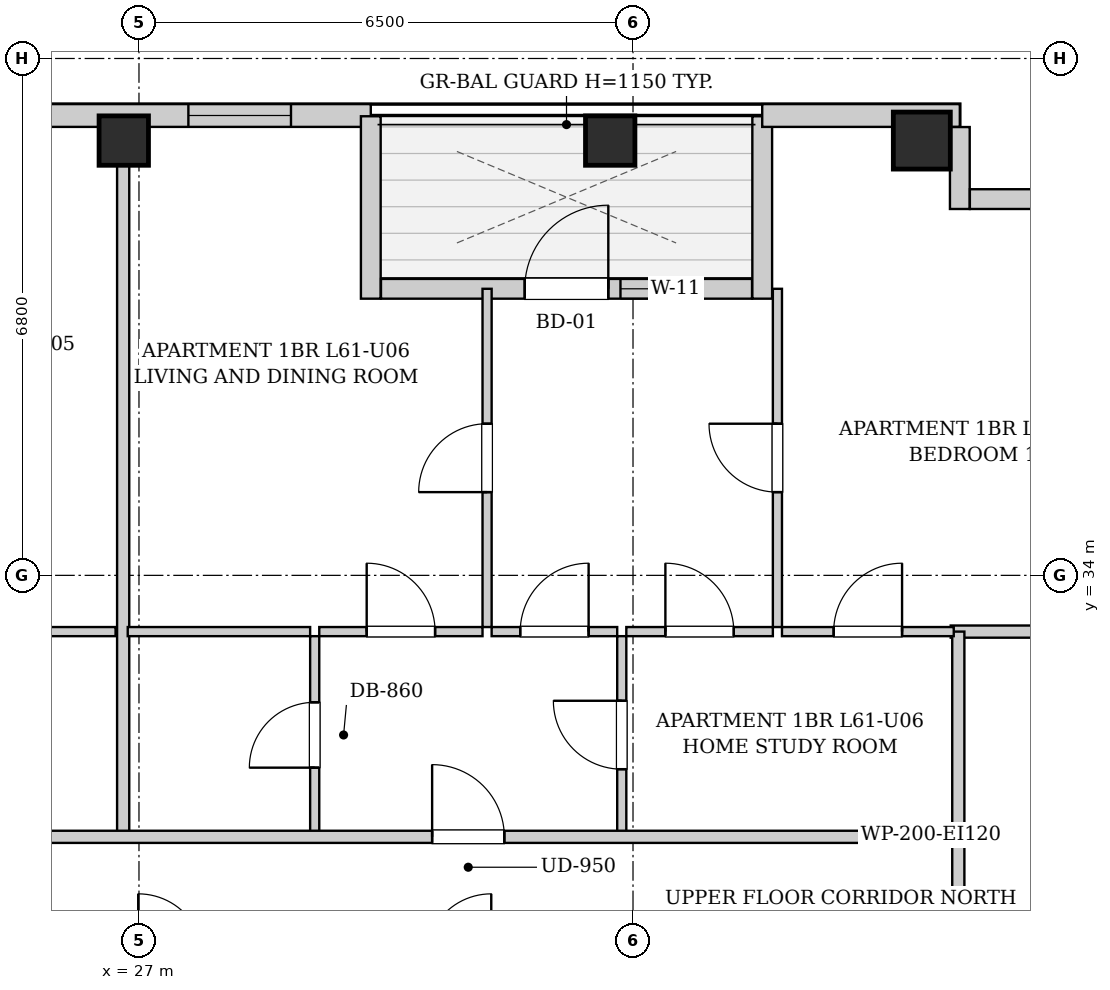
"""IFC4 building model, lengths in metres.
Left out: names, types, materials, properties, quantities, classifications, styles, units other than length and angle.
Written with IfcOpenShell. Run it as: python <this file> out.ifc"""

import sys

from ifc_helpers import new_model, si_unit, direction, frame, frame_2d, origin, origin_2d, place, context, subcontext, project, spatial, rectangle, extrude, element, fill, save


model = new_model("IFC4")
c1 = context("Model", 3, precision=1e-05, world=origin(), true_north=direction((0.0, 1.0)))
c2 = subcontext(c1, "Body", "Model", "MODEL_VIEW")
j1 = project(units=[si_unit("LENGTHUNIT", "METRE"), si_unit("PLANEANGLEUNIT", "RADIAN")], contexts=[c1])
p1 = place(None, origin())
s1 = spatial("IfcSite", under=j1, at=p1, CompositionType="ELEMENT")
p2 = place(p1, origin())
s2 = spatial("IfcBuilding", under=s1, at=p2, CompositionType="ELEMENT")
p3 = place(p2, frame((0.0, 0.0, 210.7)))
s3 = spatial("IfcBuildingStorey", under=s2, at=p3, CompositionType="ELEMENT", Elevation=210.7)
for number, where, z_axis, x_axis in (
    (1, (26.8, 39.72, 0.0), (0.0, 0.0, 1.0), (1.0, 0.0, 0.0)),
    (2, (33.2, 39.72, 0.0), (0.0, 0.0, 1.0), (1.0, 0.0, 0.0)),
):
    element("IfcColumn", number, at=place(p3, frame(where, z_axis=z_axis, x_axis=x_axis)), inside=s3, PredefinedType="COLUMN", context=c2, shape_type="SweptSolid", body=[
        extrude(rectangle(XDim=0.65, YDim=0.65, at=origin_2d()), origin(), (0.0, 0.0, 1.0), 3.3),
    ])
p4 = place(p3, frame((37.3, 39.72, 0.0), z_axis=(0.0, 0.0, 1.0), x_axis=(1.0, 0.0, 0.0)))
e3 = element("IfcColumn", 3, at=p4, inside=s3, PredefinedType="COLUMN", context=c2, shape_type="SweptSolid", body=[
    extrude(rectangle(XDim=0.75, YDim=0.75, at=origin_2d()), origin(), (0.0, 0.0, 1.0), 3.3),
])
p5 = place(p3, frame((13.1, 40.05, 0.0), z_axis=(0.0, 0.0, 1.0), x_axis=(1.0, 0.0, 0.0)))
e4 = element("IfcWall", 4, at=p5, inside=s3, PredefinedType="SOLIDWALL", context=c2, shape_type="SweptSolid", body=[
    extrude(rectangle(XDim=16.95, YDim=0.3, at=frame_2d((8.475, 0.0))), origin(), (0.0, 0.0, 1.0), 3.04),
])
p6 = place(p5, frame((2.865, 0.0, 0.55)))
e5 = element("IfcOpeningElement", 5, at=p6, cuts=e4, PredefinedType="OPENING", context=c2, shape_type="SweptSolid", body=[
    extrude(rectangle(XDim=1.35, YDim=1.2, at=frame_2d((0.675, 0.6))), frame((0.0, 0.16, 0.0), z_axis=(0.0, -1.0, 0.0), x_axis=(1.0, 0.0, 0.0)), (0.0, 0.0, 1.0), 0.32),
])
p7 = place(p5, frame((5.85, 0.0, 0.55)))
e6 = element("IfcOpeningElement", 6, at=p7, cuts=e4, PredefinedType="OPENING", context=c2, shape_type="SweptSolid", body=[
    extrude(rectangle(XDim=1.35, YDim=1.2, at=frame_2d((0.675, 0.6))), frame((0.0, 0.16, 0.0), z_axis=(0.0, -1.0, 0.0), x_axis=(1.0, 0.0, 0.0)), (0.0, 0.0, 1.0), 0.32),
])
p8 = place(p5, frame((8.72, 0.0, 0.55)))
e7 = element("IfcOpeningElement", 7, at=p8, cuts=e4, PredefinedType="OPENING", context=c2, shape_type="SweptSolid", body=[
    extrude(rectangle(XDim=0.68, YDim=1.2, at=frame_2d((0.34, 0.6))), frame((0.0, 0.16, 0.0), z_axis=(0.0, -1.0, 0.0), x_axis=(1.0, 0.0, 0.0)), (0.0, 0.0, 1.0), 0.32),
])
p9 = place(p5, frame((14.55, 0.0, 0.55)))
e8 = element("IfcOpeningElement", 8, at=p9, cuts=e4, PredefinedType="OPENING", context=c2, shape_type="SweptSolid", body=[
    extrude(rectangle(XDim=1.35, YDim=1.2, at=frame_2d((0.675, 0.6))), frame((0.0, 0.16, 0.0), z_axis=(0.0, -1.0, 0.0), x_axis=(1.0, 0.0, 0.0)), (0.0, 0.0, 1.0), 0.32),
])
p10 = place(p3, frame((30.05, 40.04, 0.0), z_axis=(0.0, 0.0, 1.0), x_axis=(0.0, -1.0, 0.0)))
e9 = element("IfcWall", 9, at=p10, inside=s3, PredefinedType="SOLIDWALL", context=c2, shape_type="SweptSolid", body=[
    extrude(rectangle(XDim=2.4, YDim=0.26, at=frame_2d((1.2, 0.0))), origin(), (0.0, 0.0, 1.0), 3.04),
])
p11 = place(p3, frame((30.184, 37.77, 0.0), z_axis=(0.0, 0.0, 1.0), x_axis=(1.0, 0.0, 0.0)))
e10 = element("IfcWall", 10, at=p11, inside=s3, PredefinedType="SOLIDWALL", context=c2, shape_type="SweptSolid", body=[
    extrude(rectangle(XDim=4.882, YDim=0.26, at=frame_2d((2.441, 0.0))), origin(), (0.0, 0.0, 1.0), 3.04),
])
p12 = place(p11, frame((1.891, 0.0, 0.0)))
e11 = element("IfcOpeningElement", 11, at=p12, cuts=e10, PredefinedType="OPENING", context=c2, shape_type="SweptSolid", body=[
    extrude(rectangle(XDim=1.1, YDim=2.0, at=frame_2d((0.55, 1.0))), frame((0.0, 0.14, 0.0), z_axis=(0.0, -1.0, 0.0), x_axis=(1.0, 0.0, 0.0)), (0.0, 0.0, 1.0), 0.28),
])
p13 = place(p11, frame((3.151, 0.0, 0.55)))
e12 = element("IfcOpeningElement", 12, at=p13, cuts=e10, PredefinedType="OPENING", context=c2, shape_type="SweptSolid", body=[
    extrude(rectangle(XDim=0.85, YDim=1.2, at=frame_2d((0.425, 0.6))), frame((0.0, 0.14, 0.0), z_axis=(0.0, -1.0, 0.0), x_axis=(1.0, 0.0, 0.0)), (0.0, 0.0, 1.0), 0.28),
])
p14 = place(p3, frame((35.2, 37.64, 0.0), z_axis=(0.0, 0.0, 1.0), x_axis=(0.0, 1.0, 0.0)))
e13 = element("IfcWall", 13, at=p14, inside=s3, PredefinedType="SOLIDWALL", context=c2, shape_type="SweptSolid", body=[
    extrude(rectangle(XDim=2.4, YDim=0.26, at=frame_2d((1.2, 0.0))), origin(), (0.0, 0.0, 1.0), 3.04),
])
p15 = place(p3, frame((35.2, 40.05, 0.0), z_axis=(0.0, 0.0, 1.0), x_axis=(1.0, 0.0, 0.0)))
e14 = element("IfcWall", 14, at=p15, inside=s3, PredefinedType="SOLIDWALL", context=c2, shape_type="SweptSolid", body=[
    extrude(rectangle(XDim=2.6, YDim=0.3, at=frame_2d((1.3, 0.0))), origin(), (0.0, 0.0, 1.0), 3.04),
])
p16 = place(p3, frame((37.8, 39.898, 0.0), z_axis=(0.0, 0.0, 1.0), x_axis=(0.0, -1.0, 0.0)))
e15 = element("IfcWall", 15, at=p16, inside=s3, PredefinedType="SOLIDWALL", context=c2, shape_type="SweptSolid", body=[
    extrude(rectangle(XDim=1.078, YDim=0.26, at=frame_2d((0.539, 0.0))), origin(), (0.0, 0.0, 1.0), 3.04),
])
p17 = place(p3, frame((37.932, 38.95, 0.0), z_axis=(0.0, 0.0, 1.0), x_axis=(1.0, 0.0, 0.0)))
e16 = element("IfcWall", 16, at=p17, inside=s3, PredefinedType="SOLIDWALL", context=c2, shape_type="SweptSolid", body=[
    extrude(rectangle(XDim=1.248, YDim=0.26, at=frame_2d((0.624, 0.0))), origin(), (0.0, 0.0, 1.0), 3.04),
])
p18 = place(p3, frame((37.78, 28.98, 0.0), z_axis=(0.0, 0.0, 1.0), x_axis=(0.0, 1.0, 0.0)))
e17 = element("IfcWall", 17, at=p18, inside=s3, PredefinedType="PARTITIONING", context=c2, shape_type="SweptSolid", body=[
    extrude(rectangle(XDim=1.58, YDim=0.16, at=frame_2d((0.79, 0.0))), origin(), (0.0, 0.0, 1.0), 3.04),
])
p19 = place(p3, frame((23.535, 33.26, 0.0), z_axis=(0.0, 0.0, 1.0), x_axis=(1.0, 0.0, 0.0)))
e18 = element("IfcWall", 18, at=p19, inside=s3, PredefinedType="PARTITIONING", context=c2, shape_type="SweptSolid", body=[
    extrude(rectangle(XDim=3.157, YDim=0.12, at=frame_2d((1.579, 0.0))), origin(), (0.0, 0.0, 1.0), 3.04),
])
p20 = place(p19, frame((1.129, 0.0, 0.0)))
e19 = element("IfcOpeningElement", 19, at=p20, cuts=e18, PredefinedType="OPENING", context=c2, shape_type="SweptSolid", body=[
    extrude(rectangle(XDim=0.9, YDim=2.05, at=frame_2d((0.45, 1.025))), frame((0.0, 0.07, 0.0), z_axis=(0.0, -1.0, 0.0), x_axis=(1.0, 0.0, 0.0)), (0.0, 0.0, 1.0), 0.14),
])
p21 = place(p3, frame((37.68, 33.26, 0.0), z_axis=(0.0, 0.0, 1.0), x_axis=(1.0, 0.0, 0.0)))
e20 = element("IfcWall", 20, at=p21, inside=s3, PredefinedType="PARTITIONING", context=c2, shape_type="SweptSolid", body=[
    extrude(rectangle(XDim=2.34, YDim=0.16, at=frame_2d((1.17, 0.0))), origin(), (0.0, 0.0, 1.0), 3.04),
])
p22 = place(p3, frame((37.78, 30.6, 0.0), z_axis=(0.0, 0.0, 1.0), x_axis=(0.0, 1.0, 0.0)))
e21 = element("IfcWall", 21, at=p22, inside=s3, PredefinedType="PARTITIONING", context=c2, shape_type="SweptSolid", body=[
    extrude(rectangle(XDim=2.66, YDim=0.16, at=frame_2d((1.33, 0.0))), origin(), (0.0, 0.0, 1.0), 3.04),
])
p23 = place(p3, frame((26.792, 30.6, 0.0), z_axis=(0.0, 0.0, 1.0), x_axis=(0.0, 1.0, 0.0)))
e22 = element("IfcWall", 22, at=p23, inside=s3, PredefinedType="PARTITIONING", context=c2, shape_type="SweptSolid", body=[
    extrude(rectangle(XDim=9.32, YDim=0.16, at=frame_2d((4.66, 0.0))), origin(), (0.0, 0.0, 1.0), 3.04),
])
p24 = place(p3, frame((29.312, 30.6, 0.0), z_axis=(0.0, 0.0, 1.0), x_axis=(0.0, 1.0, 0.0)))
e23 = element("IfcWall", 23, at=p24, inside=s3, PredefinedType="PARTITIONING", context=c2, shape_type="SweptSolid", body=[
    extrude(rectangle(XDim=2.6, YDim=0.12, at=frame_2d((1.3, 0.0))), origin(), (0.0, 0.0, 1.0), 3.04),
])
p25 = place(p24, frame((0.87, 0.0, 0.0)))
e24 = element("IfcOpeningElement", 24, at=p25, cuts=e23, PredefinedType="OPENING", context=c2, shape_type="SweptSolid", body=[
    extrude(rectangle(XDim=0.86, YDim=2.05, at=frame_2d((0.43, 1.025))), frame((0.0, 0.07, 0.0), z_axis=(0.0, -1.0, 0.0), x_axis=(1.0, 0.0, 0.0)), (0.0, 0.0, 1.0), 0.14),
])
p26 = place(p3, frame((26.852, 33.26, 0.0), z_axis=(0.0, 0.0, 1.0), x_axis=(1.0, 0.0, 0.0)))
e25 = element("IfcWall", 25, at=p26, inside=s3, PredefinedType="PARTITIONING", context=c2, shape_type="SweptSolid", body=[
    extrude(rectangle(XDim=2.4, YDim=0.12, at=frame_2d((1.2, 0.0))), origin(), (0.0, 0.0, 1.0), 3.04),
])
p27 = place(p3, frame((33.352, 30.6, 0.0), z_axis=(0.0, 0.0, 1.0), x_axis=(0.0, 1.0, 0.0)))
e26 = element("IfcWall", 26, at=p27, inside=s3, PredefinedType="PARTITIONING", context=c2, shape_type="SweptSolid", body=[
    extrude(rectangle(XDim=2.6, YDim=0.12, at=frame_2d((1.3, 0.0))), origin(), (0.0, 0.0, 1.0), 3.04),
])
p28 = place(p27, frame((0.85, 0.0, 0.0)))
e27 = element("IfcOpeningElement", 27, at=p28, cuts=e26, PredefinedType="OPENING", context=c2, shape_type="SweptSolid", body=[
    extrude(rectangle(XDim=0.9, YDim=2.05, at=frame_2d((0.45, 1.025))), frame((0.0, 0.07, 0.0), z_axis=(0.0, -1.0, 0.0), x_axis=(1.0, 0.0, 0.0)), (0.0, 0.0, 1.0), 0.14),
])
p29 = place(p3, frame((29.372, 33.26, 0.0), z_axis=(0.0, 0.0, 1.0), x_axis=(1.0, 0.0, 0.0)))
e28 = element("IfcWall", 28, at=p29, inside=s3, PredefinedType="PARTITIONING", context=c2, shape_type="SweptSolid", body=[
    extrude(rectangle(XDim=2.148, YDim=0.12, at=frame_2d((1.074, 0.0))), origin(), (0.0, 0.0, 1.0), 3.04),
])
p30 = place(p29, frame((0.624, 0.0, 0.0)))
e29 = element("IfcOpeningElement", 29, at=p30, cuts=e28, PredefinedType="OPENING", context=c2, shape_type="SweptSolid", body=[
    extrude(rectangle(XDim=0.9, YDim=2.05, at=frame_2d((0.45, 1.025))), frame((0.0, 0.07, 0.0), z_axis=(0.0, -1.0, 0.0), x_axis=(1.0, 0.0, 0.0)), (0.0, 0.0, 1.0), 0.14),
])
p31 = place(p3, frame((31.64, 33.26, 0.0), z_axis=(0.0, 0.0, 1.0), x_axis=(1.0, 0.0, 0.0)))
e30 = element("IfcWall", 30, at=p31, inside=s3, PredefinedType="PARTITIONING", context=c2, shape_type="SweptSolid", body=[
    extrude(rectangle(XDim=1.652, YDim=0.12, at=frame_2d((0.826, 0.0))), origin(), (0.0, 0.0, 1.0), 3.04),
])
p32 = place(p31, frame((0.376, 0.0, 0.0)))
e31 = element("IfcOpeningElement", 31, at=p32, cuts=e30, PredefinedType="OPENING", context=c2, shape_type="SweptSolid", body=[
    extrude(rectangle(XDim=0.9, YDim=2.05, at=frame_2d((0.45, 1.025))), frame((0.0, 0.07, 0.0), z_axis=(0.0, -1.0, 0.0), x_axis=(1.0, 0.0, 0.0)), (0.0, 0.0, 1.0), 0.14),
])
p33 = place(p3, frame((33.412, 33.26, 0.0), z_axis=(0.0, 0.0, 1.0), x_axis=(1.0, 0.0, 0.0)))
e32 = element("IfcWall", 32, at=p33, inside=s3, PredefinedType="PARTITIONING", context=c2, shape_type="SweptSolid", body=[
    extrude(rectangle(XDim=1.928, YDim=0.12, at=frame_2d((0.964, 0.0))), origin(), (0.0, 0.0, 1.0), 3.04),
])
p34 = place(p33, frame((0.514, 0.0, 0.0)))
e33 = element("IfcOpeningElement", 33, at=p34, cuts=e32, PredefinedType="OPENING", context=c2, shape_type="SweptSolid", body=[
    extrude(rectangle(XDim=0.9, YDim=2.05, at=frame_2d((0.45, 1.025))), frame((0.0, 0.07, 0.0), z_axis=(0.0, -1.0, 0.0), x_axis=(1.0, 0.0, 0.0)), (0.0, 0.0, 1.0), 0.14),
])
p35 = place(p3, frame((35.46, 33.26, 0.0), z_axis=(0.0, 0.0, 1.0), x_axis=(1.0, 0.0, 0.0)))
e34 = element("IfcWall", 34, at=p35, inside=s3, PredefinedType="PARTITIONING", context=c2, shape_type="SweptSolid", body=[
    extrude(rectangle(XDim=2.26, YDim=0.12, at=frame_2d((1.13, 0.0))), origin(), (0.0, 0.0, 1.0), 3.04),
])
p36 = place(p35, frame((0.68, 0.0, 0.0)))
e35 = element("IfcOpeningElement", 35, at=p36, cuts=e34, PredefinedType="OPENING", context=c2, shape_type="SweptSolid", body=[
    extrude(rectangle(XDim=0.9, YDim=2.05, at=frame_2d((0.45, 1.025))), frame((0.0, 0.07, 0.0), z_axis=(0.0, -1.0, 0.0), x_axis=(1.0, 0.0, 0.0)), (0.0, 0.0, 1.0), 0.14),
])
p37 = place(p3, frame((31.58, 33.32, 0.0), z_axis=(0.0, 0.0, 1.0), x_axis=(0.0, 1.0, 0.0)))
e36 = element("IfcWall", 36, at=p37, inside=s3, PredefinedType="PARTITIONING", context=c2, shape_type="SweptSolid", body=[
    extrude(rectangle(XDim=4.45, YDim=0.12, at=frame_2d((2.225, 0.0))), origin(), (0.0, 0.0, 1.0), 3.04),
])
p38 = place(p37, frame((1.775, 0.0, 0.0)))
e37 = element("IfcOpeningElement", 37, at=p38, cuts=e36, PredefinedType="OPENING", context=c2, shape_type="SweptSolid", body=[
    extrude(rectangle(XDim=0.9, YDim=2.05, at=frame_2d((0.45, 1.025))), frame((0.0, 0.07, 0.0), z_axis=(0.0, -1.0, 0.0), x_axis=(1.0, 0.0, 0.0)), (0.0, 0.0, 1.0), 0.14),
])
p39 = place(p3, frame((35.4, 33.32, 0.0), z_axis=(0.0, 0.0, 1.0), x_axis=(0.0, 1.0, 0.0)))
e38 = element("IfcWall", 38, at=p39, inside=s3, PredefinedType="PARTITIONING", context=c2, shape_type="SweptSolid", body=[
    extrude(rectangle(XDim=4.45, YDim=0.12, at=frame_2d((2.225, 0.0))), origin(), (0.0, 0.0, 1.0), 3.04),
])
p40 = place(p39, frame((1.775, 0.0, 0.0)))
e39 = element("IfcOpeningElement", 39, at=p40, cuts=e38, PredefinedType="OPENING", context=c2, shape_type="SweptSolid", body=[
    extrude(rectangle(XDim=0.9, YDim=2.05, at=frame_2d((0.45, 1.025))), frame((0.0, 0.07, 0.0), z_axis=(0.0, -1.0, 0.0), x_axis=(1.0, 0.0, 0.0)), (0.0, 0.0, 1.0), 0.14),
])
p41 = place(p3, frame((13.15, 30.56, 0.0), z_axis=(0.0, 0.0, 1.0), x_axis=(1.0, 0.0, 0.0)))
e40 = element("IfcWall", 40, at=p41, inside=s3, PredefinedType="PARTITIONING", context=c2, shape_type="SweptSolid", body=[
    extrude(rectangle(XDim=24.6, YDim=0.16, at=frame_2d((12.3, 0.0))), origin(), (0.0, 0.0, 1.0), 3.04),
])
p42 = place(p41, frame((3.115, 0.0, 0.0)))
e41 = element("IfcOpeningElement", 41, at=p42, cuts=e40, PredefinedType="OPENING", context=c2, shape_type="SweptSolid", body=[
    extrude(rectangle(XDim=0.95, YDim=2.1, at=frame_2d((0.475, 1.05))), frame((0.0, 0.09, 0.0), z_axis=(0.0, -1.0, 0.0), x_axis=(1.0, 0.0, 0.0)), (0.0, 0.0, 1.0), 0.18),
])
p43 = place(p41, frame((11.489, 0.0, 0.0)))
e42 = element("IfcOpeningElement", 42, at=p43, cuts=e40, PredefinedType="OPENING", context=c2, shape_type="SweptSolid", body=[
    extrude(rectangle(XDim=0.95, YDim=2.1, at=frame_2d((0.475, 1.05))), frame((0.0, 0.09, 0.0), z_axis=(0.0, -1.0, 0.0), x_axis=(1.0, 0.0, 0.0)), (0.0, 0.0, 1.0), 0.18),
])
p44 = place(p41, frame((17.707, 0.0, 0.0)))
e43 = element("IfcOpeningElement", 43, at=p44, cuts=e40, PredefinedType="OPENING", context=c2, shape_type="SweptSolid", body=[
    extrude(rectangle(XDim=0.95, YDim=2.1, at=frame_2d((0.475, 1.05))), frame((0.0, 0.09, 0.0), z_axis=(0.0, -1.0, 0.0), x_axis=(1.0, 0.0, 0.0)), (0.0, 0.0, 1.0), 0.18),
])
p45 = place(p25, origin())
e44 = element("IfcDoor", 44, at=p45, inside=s3, OperationType="SINGLE_SWING_LEFT", PredefinedType="DOOR", context=c2, shape_type="SweptSolid", body=[
    extrude(rectangle(XDim=0.86, YDim=2.05, at=frame_2d((0.43, 1.025))), frame((0.0, 0.025, 0.0), z_axis=(0.0, -1.0, 0.0), x_axis=(1.0, 0.0, 0.0)), (0.0, 0.0, 1.0), 0.05),
])
fill(e24, e44)
p46 = place(p28, origin())
e45 = element("IfcDoor", 45, at=p46, inside=s3, OperationType="SINGLE_SWING_RIGHT", PredefinedType="DOOR", context=c2, shape_type="SweptSolid", body=[
    extrude(rectangle(XDim=0.9, YDim=2.05, at=frame_2d((0.45, 1.025))), frame((0.0, 0.025, 0.0), z_axis=(0.0, -1.0, 0.0), x_axis=(1.0, 0.0, 0.0)), (0.0, 0.0, 1.0), 0.05),
])
fill(e27, e45)
p47 = place(p30, origin())
e46 = element("IfcDoor", 46, at=p47, inside=s3, OperationType="SINGLE_SWING_LEFT", PredefinedType="DOOR", context=c2, shape_type="SweptSolid", body=[
    extrude(rectangle(XDim=0.9, YDim=2.05, at=frame_2d((0.45, 1.025))), frame((0.0, 0.025, 0.0), z_axis=(0.0, -1.0, 0.0), x_axis=(1.0, 0.0, 0.0)), (0.0, 0.0, 1.0), 0.05),
])
fill(e29, e46)
p48 = place(p32, origin())
e47 = element("IfcDoor", 47, at=p48, inside=s3, OperationType="SINGLE_SWING_RIGHT", PredefinedType="DOOR", context=c2, shape_type="SweptSolid", body=[
    extrude(rectangle(XDim=0.9, YDim=2.05, at=frame_2d((0.45, 1.025))), frame((0.0, 0.025, 0.0), z_axis=(0.0, -1.0, 0.0), x_axis=(1.0, 0.0, 0.0)), (0.0, 0.0, 1.0), 0.05),
])
fill(e31, e47)
p49 = place(p34, origin())
e48 = element("IfcDoor", 48, at=p49, inside=s3, OperationType="SINGLE_SWING_LEFT", PredefinedType="DOOR", context=c2, shape_type="SweptSolid", body=[
    extrude(rectangle(XDim=0.9, YDim=2.05, at=frame_2d((0.45, 1.025))), frame((0.0, 0.025, 0.0), z_axis=(0.0, -1.0, 0.0), x_axis=(1.0, 0.0, 0.0)), (0.0, 0.0, 1.0), 0.05),
])
fill(e33, e48)
p50 = place(p36, origin())
e49 = element("IfcDoor", 49, at=p50, inside=s3, OperationType="SINGLE_SWING_RIGHT", PredefinedType="DOOR", context=c2, shape_type="SweptSolid", body=[
    extrude(rectangle(XDim=0.9, YDim=2.05, at=frame_2d((0.45, 1.025))), frame((0.0, 0.025, 0.0), z_axis=(0.0, -1.0, 0.0), x_axis=(1.0, 0.0, 0.0)), (0.0, 0.0, 1.0), 0.05),
])
fill(e35, e49)
p51 = place(p38, origin())
e50 = element("IfcDoor", 50, at=p51, inside=s3, OperationType="SINGLE_SWING_LEFT", PredefinedType="DOOR", context=c2, shape_type="SweptSolid", body=[
    extrude(rectangle(XDim=0.9, YDim=2.05, at=frame_2d((0.45, 1.025))), frame((0.0, 0.025, 0.0), z_axis=(0.0, -1.0, 0.0), x_axis=(1.0, 0.0, 0.0)), (0.0, 0.0, 1.0), 0.05),
])
fill(e37, e50)
p52 = place(p40, origin())
e51 = element("IfcDoor", 51, at=p52, inside=s3, OperationType="SINGLE_SWING_RIGHT", PredefinedType="DOOR", context=c2, shape_type="SweptSolid", body=[
    extrude(rectangle(XDim=0.9, YDim=2.05, at=frame_2d((0.45, 1.025))), frame((0.0, 0.025, 0.0), z_axis=(0.0, -1.0, 0.0), x_axis=(1.0, 0.0, 0.0)), (0.0, 0.0, 1.0), 0.05),
])
fill(e39, e51)
p53 = place(p44, origin())
e52 = element("IfcDoor", 52, at=p53, inside=s3, OperationType="SINGLE_SWING_LEFT", PredefinedType="DOOR", context=c2, shape_type="SweptSolid", body=[
    extrude(rectangle(XDim=0.95, YDim=2.1, at=frame_2d((0.475, 1.05))), frame((0.0, 0.025, 0.0), z_axis=(0.0, -1.0, 0.0), x_axis=(1.0, 0.0, 0.0)), (0.0, 0.0, 1.0), 0.05),
])
fill(e43, e52)
p54 = place(p12, origin())
e53 = element("IfcDoor", 53, at=p54, inside=s3, OperationType="SINGLE_SWING_RIGHT", PredefinedType="DOOR", context=c2, shape_type="SweptSolid", body=[
    extrude(rectangle(XDim=1.1, YDim=2.0, at=frame_2d((0.55, 1.0))), frame((0.0, 0.025, 0.0), z_axis=(0.0, -1.0, 0.0), x_axis=(1.0, 0.0, 0.0)), (0.0, 0.0, 1.0), 0.05),
])
fill(e11, e53)
p55 = place(p9, origin())
e54 = element("IfcWindow", 54, at=p55, inside=s3, PartitioningType="SINGLE_PANEL", PredefinedType="WINDOW", context=c2, shape_type="SweptSolid", body=[
    extrude(rectangle(XDim=1.35, YDim=1.2, at=frame_2d((0.675, 0.6))), frame((0.0, 0.03, 0.0), z_axis=(0.0, -1.0, 0.0), x_axis=(1.0, 0.0, 0.0)), (0.0, 0.0, 1.0), 0.06),
])
fill(e8, e54)
p56 = place(p13, origin())
e55 = element("IfcWindow", 55, at=p56, inside=s3, PartitioningType="SINGLE_PANEL", PredefinedType="WINDOW", context=c2, shape_type="SweptSolid", body=[
    extrude(rectangle(XDim=0.85, YDim=1.2, at=frame_2d((0.425, 0.6))), frame((0.0, 0.03, 0.0), z_axis=(0.0, -1.0, 0.0), x_axis=(1.0, 0.0, 0.0)), (0.0, 0.0, 1.0), 0.06),
])
fill(e12, e55)
save(model, sys.argv[1])
